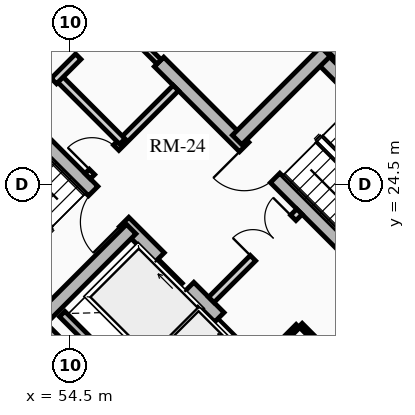
"""IFC4 building model, lengths in metres.
Left out: names, types, materials, properties, quantities, classifications, styles, units other than length and angle.
Written with IfcOpenShell. Run it as: python <this file> out.ifc"""

import sys

from ifc_helpers import new_model, si_unit, direction, frame, frame_2d, origin, place, context, subcontext, project, spatial, rectangle, extrude, source, transform, mapped, element, fill, save


model = new_model("IFC4")
c1 = context("Model", 3, precision=1e-05, world=origin(), true_north=direction((0.0, 1.0)))
c2 = subcontext(c1, "Body", "Model", "MODEL_VIEW")
j1 = project(units=[si_unit("LENGTHUNIT", "METRE"), si_unit("PLANEANGLEUNIT", "RADIAN")], contexts=[c1])
p1 = place(None, origin())
s1 = spatial("IfcSite", under=j1, at=p1, CompositionType="ELEMENT")
p2 = place(p1, origin())
s2 = spatial("IfcBuilding", under=s1, at=p2, CompositionType="ELEMENT")
p3 = place(p2, frame((0.0, 0.0, 177.79)))
s3 = spatial("IfcBuildingStorey", under=s2, at=p3, CompositionType="ELEMENT", Elevation=177.79)
for number, where, z_axis, x_axis in (
    (1, (58.702, 15.732, 0.0), (0.0, 0.0, 1.0), (-0.707, 0.707, 0.0)),
    (2, (66.268, 23.298, 0.0), (0.0, 0.0, 1.0), (-0.707, 0.707, 0.0)),
):
    element("IfcWall", number, at=place(p3, frame(where, z_axis=z_axis, x_axis=x_axis)), inside=s3, PredefinedType="SHEAR", context=c2, shape_type="SweptSolid", body=[
        extrude(rectangle(XDim=14.1, YDim=0.4, at=frame_2d((7.05, 0.0))), origin(), (0.0, 0.0, 1.0), 2.91),
    ])
p4 = place(p3, frame((58.561, 15.873, 0.0), z_axis=(0.0, 0.0, 1.0), x_axis=(0.707106781187, 0.707106781187, 0.0)))
e3 = element("IfcWall", 3, at=p4, inside=s3, PredefinedType="SHEAR", context=c2, shape_type="SweptSolid", body=[
    extrude(rectangle(XDim=10.7, YDim=0.4, at=frame_2d((5.35, 0.0))), origin(), (0.0, 0.0, 1.0), 2.91),
])
m1 = source(origin(), c2, "Body", "SweptSolid", [
    extrude(rectangle(XDim=1.5, YDim=2.02, at=frame_2d((0.75, 1.01))), frame((0.0, 0.21, 0.0), z_axis=(0.0, -1.0, 0.0), x_axis=(1.0, 0.0, 0.0)), (0.0, 0.0, 1.0), 0.42),
])
p5 = place(p4, frame((5.45, 0.0, 0.0)))
e4 = element("IfcOpeningElement", 4, at=p5, cuts=e3, PredefinedType="OPENING", context=c2, shape_type="MappedRepresentation", body=[
    mapped(m1, transform((0.0, 0.0, 0.0), x_axis=(1.0, 0.0, 0.0), y_axis=(0.0, 1.0, 0.0), z_axis=(0.0, 0.0, 1.0), scale=1.0)),
])
p6 = place(p3, frame((48.873, 25.561, 0.0), z_axis=(0.0, 0.0, 1.0), x_axis=(0.707106781187, 0.707106781187, 0.0)))
e5 = element("IfcWall", 5, at=p6, inside=s3, PredefinedType="SHEAR", context=c2, shape_type="SweptSolid", body=[
    extrude(rectangle(XDim=10.7, YDim=0.4, at=frame_2d((5.35, 0.0))), origin(), (0.0, 0.0, 1.0), 2.91),
])
p7 = place(p6, frame((4.6, 0.0, 0.0)))
e6 = element("IfcOpeningElement", 6, at=p7, cuts=e5, PredefinedType="OPENING", context=c2, shape_type="MappedRepresentation", body=[
    mapped(m1, transform((0.0, 0.0, 0.0), x_axis=(1.0, 0.0, 0.0), y_axis=(0.0, 1.0, 0.0), z_axis=(0.0, 0.0, 1.0), scale=1.0)),
])
p8 = place(p3, frame((61.06, 18.373, 0.0), z_axis=(0.0, 0.0, 1.0), x_axis=(-0.707106781187, 0.707106781187, 0.0)))
e7 = element("IfcWall", 7, at=p8, inside=s3, PredefinedType="SHEAR", context=c2, shape_type="SweptSolid", body=[
    extrude(rectangle(XDim=13.7, YDim=0.35, at=frame_2d((6.85, 0.0))), origin(), (0.0, 0.0, 1.0), 2.91),
])
m2 = source(origin(), c2, "Body", "SweptSolid", [
    extrude(rectangle(XDim=1.1, YDim=2.015, at=frame_2d((0.55, 1.007))), frame((0.0, 0.185, 0.0), z_axis=(0.0, -1.0, 0.0), x_axis=(1.0, 0.0, 0.0)), (0.0, 0.0, 1.0), 0.37),
])
p9 = place(p8, frame((4.85, 0.0, 0.0)))
e8 = element("IfcOpeningElement", 8, at=p9, cuts=e7, PredefinedType="OPENING", context=c2, shape_type="MappedRepresentation", body=[
    mapped(m2, transform((0.0, 0.0, 0.0), x_axis=(1.0, 0.0, 0.0), y_axis=(0.0, 1.0, 0.0), z_axis=(0.0, 0.0, 1.0), scale=1.0)),
])
p10 = place(p8, frame((0.625, 0.0, 0.0)))
e9 = element("IfcOpeningElement", 9, at=p10, cuts=e7, PredefinedType="OPENING", context=c2, shape_type="MappedRepresentation", body=[
    mapped(m2, transform((0.0, 0.0, 0.0), x_axis=(1.0, 0.0, 0.0), y_axis=(0.0, 1.0, 0.0), z_axis=(0.0, 0.0, 1.0), scale=1.0)),
])
p11 = place(p8, frame((2.625, 0.0, 0.0)))
e10 = element("IfcOpeningElement", 10, at=p11, cuts=e7, PredefinedType="OPENING", context=c2, shape_type="MappedRepresentation", body=[
    mapped(m2, transform((0.0, 0.0, 0.0), x_axis=(1.0, 0.0, 0.0), y_axis=(0.0, 1.0, 0.0), z_axis=(0.0, 0.0, 1.0), scale=1.0)),
])
m3 = source(origin(), c2, "Body", "SweptSolid", [
    extrude(rectangle(XDim=1.15, YDim=2.02, at=frame_2d((0.575, 1.01))), frame((0.0, 0.185, 0.0), z_axis=(0.0, -1.0, 0.0), x_axis=(1.0, 0.0, 0.0)), (0.0, 0.0, 1.0), 0.37),
])
p12 = place(p8, frame((7.27, 0.0, 0.0)))
e11 = element("IfcOpeningElement", 11, at=p12, cuts=e7, PredefinedType="OPENING", context=c2, shape_type="MappedRepresentation", body=[
    mapped(m3, transform((0.0, 0.0, 0.0), x_axis=(1.0, 0.0, 0.0), y_axis=(0.0, 1.0, 0.0), z_axis=(0.0, 0.0, 1.0), scale=1.0)),
])
p13 = place(p3, frame((63.627, 20.94, 0.0), z_axis=(0.0, 0.0, 1.0), x_axis=(-0.707119496762, 0.707094065383, 0.0)))
e12 = element("IfcWall", 12, at=p13, inside=s3, PredefinedType="SHEAR", context=c2, shape_type="SweptSolid", body=[
    extrude(rectangle(XDim=9.6, YDim=0.35, at=frame_2d((4.8, 0.0))), origin(), (0.0, 0.0, 1.0), 2.91),
])
p14 = place(p13, frame((5.28, 0.0, 0.0)))
e13 = element("IfcOpeningElement", 13, at=p14, cuts=e12, PredefinedType="OPENING", context=c2, shape_type="MappedRepresentation", body=[
    mapped(m3, transform((0.0, 0.0, 0.0), x_axis=(1.0, 0.0, 0.0), y_axis=(0.0, 1.0, 0.0), z_axis=(0.0, 0.0, 1.0), scale=1.0)),
])
p15 = place(p3, frame((53.922, 21.141, 0.0), z_axis=(0.0, 0.0, 1.0), x_axis=(-0.707106781187, 0.707106781187, 0.0)))
e14 = element("IfcWall", 14, at=p15, inside=s3, PredefinedType="SHEAR", context=c2, shape_type="SweptSolid", body=[
    extrude(rectangle(XDim=6.695, YDim=0.35, at=frame_2d((3.348, 0.0))), origin(), (0.0, 0.0, 1.0), 2.91),
])
p16 = place(p3, frame((53.784, 21.003, 0.0), z_axis=(0.0, 0.0, 1.0), x_axis=(0.707106781187, 0.707106781187, 0.0)))
e15 = element("IfcWall", 15, at=p16, inside=s3, PredefinedType="SHEAR", context=c2, shape_type="SweptSolid", body=[
    extrude(rectangle(XDim=3.285, YDim=0.35, at=frame_2d((1.643, 0.0))), origin(), (0.0, 0.0, 1.0), 2.91),
])
p17 = place(p3, frame((65.812, 23.125, 0.0), z_axis=(0.0, 0.0, 1.0), x_axis=(-0.707106781187, 0.707106781187, 0.0)))
e16 = element("IfcWall", 16, at=p17, inside=s3, PredefinedType="SHEAR", context=c2, shape_type="SweptSolid", body=[
    extrude(rectangle(XDim=6.695, YDim=0.35, at=frame_2d((3.348, 0.0))), origin(), (0.0, 0.0, 1.0), 2.91),
])
p18 = place(p3, frame((58.893, 25.674, 0.0), z_axis=(0.0, 0.0, 1.0), x_axis=(0.707106781187, 0.707106781187, 0.0)))
e17 = element("IfcWall", 17, at=p18, inside=s3, PredefinedType="SHEAR", context=c2, shape_type="SweptSolid", body=[
    extrude(rectangle(XDim=3.285, YDim=0.35, at=frame_2d((1.643, 0.0))), origin(), (0.0, 0.0, 1.0), 2.91),
])
p19 = place(p3, frame((55.888, 19.069, 0.0), z_axis=(0.0, 0.0, 1.0), x_axis=(0.707106781187, 0.707106781187, 0.0)))
e18 = element("IfcWall", 18, at=p19, inside=s3, PredefinedType="SHEAR", context=c2, shape_type="SweptSolid", body=[
    extrude(rectangle(XDim=2.97, YDim=0.2, at=frame_2d((1.485, 0.0))), origin(), (0.0, 0.0, 1.0), 2.91),
])
p20 = place(p3, frame((56.015, 19.366, 0.0), z_axis=(0.0, 0.0, 1.0), x_axis=(-0.707106781187, 0.707106781187, 0.0)))
e19 = element("IfcWall", 19, at=p20, inside=s3, PredefinedType="SHEAR", context=c2, shape_type="SweptSolid", body=[
    extrude(rectangle(XDim=2.44, YDim=0.2, at=frame_2d((1.22, 0.0))), origin(), (0.0, 0.0, 1.0), 2.91),
])
p21 = place(p3, frame((58.214, 21.467, 0.0), z_axis=(0.0, 0.0, 1.0), x_axis=(0.707106781187, 0.707106781187, 0.0)))
e20 = element("IfcWall", 20, at=p21, inside=s3, PredefinedType="PARTITIONING", context=c2, shape_type="SweptSolid", body=[
    extrude(rectangle(XDim=3.28, YDim=0.2, at=frame_2d((1.64, 0.0))), origin(), (0.0, 0.0, 1.0), 2.675),
])
m4 = source(origin(), c2, "Body", "SweptSolid", [
    extrude(rectangle(XDim=1.5, YDim=2.02, at=frame_2d((0.75, 1.01))), frame((0.0, 0.11, 0.0), z_axis=(0.0, -1.0, 0.0), x_axis=(1.0, 0.0, 0.0)), (0.0, 0.0, 1.0), 0.22),
])
p22 = place(p21, frame((1.55, 0.0, 0.0)))
e21 = element("IfcOpeningElement", 21, at=p22, cuts=e20, PredefinedType="OPENING", context=c2, shape_type="MappedRepresentation", body=[
    mapped(m4, transform((0.0, 0.0, 0.0), x_axis=(1.0, 0.0, 0.0), y_axis=(0.0, 1.0, 0.0), z_axis=(0.0, 0.0, 1.0), scale=1.0)),
])
p23 = place(p3, frame((54.961, 24.719, 0.0), z_axis=(0.0, 0.0, 1.0), x_axis=(0.707106781187, 0.707106781187, 0.0)))
e22 = element("IfcWall", 22, at=p23, inside=s3, PredefinedType="PARTITIONING", context=c2, shape_type="SweptSolid", body=[
    extrude(rectangle(XDim=3.28, YDim=0.2, at=frame_2d((1.64, 0.0))), origin(), (0.0, 0.0, 1.0), 2.675),
])
m5 = source(origin(), c2, "Body", "SweptSolid", [
    extrude(rectangle(XDim=0.9, YDim=2.005, at=frame_2d((0.45, 1.002))), frame((0.0, 0.11, 0.0), z_axis=(0.0, -1.0, 0.0), x_axis=(1.0, 0.0, 0.0)), (0.0, 0.0, 1.0), 0.22),
])
p24 = place(p23, frame((0.16, 0.0, 0.0)))
e23 = element("IfcOpeningElement", 23, at=p24, cuts=e22, PredefinedType="OPENING", context=c2, shape_type="MappedRepresentation", body=[
    mapped(m5, transform((0.0, 0.0, 0.0), x_axis=(1.0, 0.0, 0.0), y_axis=(0.0, 1.0, 0.0), z_axis=(0.0, 0.0, 1.0), scale=1.0)),
])
p25 = place(p3, frame((55.874, 25.631, 0.0), z_axis=(0.0, 0.0, 1.0), x_axis=(-0.707157639372, 0.707055919343, 0.0)))
e24 = element("IfcWall", 24, at=p25, inside=s3, PredefinedType="PARTITIONING", context=c2, shape_type="SweptSolid", body=[
    extrude(rectangle(XDim=2.4, YDim=0.2, at=frame_2d((1.2, 0.0))), origin(), (0.0, 0.0, 1.0), 2.675),
])
p26 = place(p3, frame((53.264, 26.416, 0.0), z_axis=(0.0, 0.0, 1.0), x_axis=(0.707106781187, 0.707106781187, 0.0)))
e25 = element("IfcWall", 25, at=p26, inside=s3, PredefinedType="PARTITIONING", context=c2, shape_type="SweptSolid", body=[
    extrude(rectangle(XDim=3.28, YDim=0.2, at=frame_2d((1.64, 0.0))), origin(), (0.0, 0.0, 1.0), 2.675),
])
m6 = source(origin(), c2, "Body", "SweptSolid", [
    extrude(rectangle(XDim=1.0, YDim=2.015, at=frame_2d((0.5, 1.007))), frame((0.0, 0.11, 0.0), z_axis=(0.0, -1.0, 0.0), x_axis=(1.0, 0.0, 0.0)), (0.0, 0.0, 1.0), 0.22),
])
p27 = place(p26, frame((0.14, 0.0, 0.0)))
e26 = element("IfcOpeningElement", 26, at=p27, cuts=e25, PredefinedType="OPENING", context=c2, shape_type="MappedRepresentation", body=[
    mapped(m6, transform((0.0, 0.0, 0.0), x_axis=(1.0, 0.0, 0.0), y_axis=(0.0, 1.0, 0.0), z_axis=(0.0, 0.0, 1.0), scale=1.0)),
])
p28 = place(p26, frame((2.05, 0.0, 0.0)))
e27 = element("IfcOpeningElement", 27, at=p28, cuts=e25, PredefinedType="OPENING", context=c2, shape_type="MappedRepresentation", body=[
    mapped(m5, transform((0.0, 0.0, 0.0), x_axis=(1.0, 0.0, 0.0), y_axis=(0.0, 1.0, 0.0), z_axis=(0.0, 0.0, 1.0), scale=1.0)),
])
p29 = place(p3, frame((61.835, 19.529, 0.0), z_axis=(0.0, 0.0, 1.0), x_axis=(-0.707174592913, 0.707038962956, 0.0)))
e28 = element("IfcWall", 28, at=p29, inside=s3, PredefinedType="PARTITIONING", context=c2, shape_type="SweptSolid", body=[
    extrude(rectangle(XDim=1.8, YDim=0.125, at=frame_2d((0.9, 0.0))), origin(), (0.0, 0.0, 1.0), 2.675),
])
m7 = source(origin(), c2, "Body", "SweptSolid", [
    extrude(rectangle(XDim=0.9, YDim=2.005, at=frame_2d((0.45, 1.002))), frame((0.0, 0.073, 0.0), z_axis=(0.0, -1.0, 0.0), x_axis=(1.0, 0.0, 0.0)), (0.0, 0.0, 1.0), 0.145),
])
p30 = place(p29, frame((0.42, 0.0, 0.0)))
e29 = element("IfcOpeningElement", 29, at=p30, cuts=e28, PredefinedType="OPENING", context=c2, shape_type="MappedRepresentation", body=[
    mapped(m7, transform((0.0, 0.0, 0.0), x_axis=(1.0, 0.0, 0.0), y_axis=(0.0, 1.0, 0.0), z_axis=(0.0, 0.0, 1.0), scale=1.0)),
])
p31 = place(p3, frame((59.713, 19.996, 0.0), z_axis=(0.0, 0.0, 1.0), x_axis=(0.707217726, 0.706995818963, 0.0)))
e30 = element("IfcWall", 30, at=p31, inside=s3, PredefinedType="PARTITIONING", context=c2, shape_type="SweptSolid", body=[
    extrude(rectangle(XDim=1.1, YDim=0.125, at=frame_2d((0.55, 0.0))), origin(), (0.0, 0.0, 1.0), 2.675),
])
p32 = place(p3, frame((56.839, 27.728, 0.0), z_axis=(0.0, 0.0, 1.0), x_axis=(-0.707106781187, 0.707106781187, 0.0)))
e31 = element("IfcWall", 31, at=p32, inside=s3, PredefinedType="PARTITIONING", context=c2, shape_type="SweptSolid", body=[
    extrude(rectangle(XDim=3.9, YDim=0.16, at=frame_2d((1.95, 0.0))), origin(), (0.0, 0.0, 1.0), 2.675),
])
m8 = source(origin(), c2, "Body", "SweptSolid", [
    extrude(rectangle(XDim=0.9, YDim=2.005, at=frame_2d((0.45, 1.002))), frame((0.0, 0.09, 0.0), z_axis=(0.0, -1.0, 0.0), x_axis=(1.0, 0.0, 0.0)), (0.0, 0.0, 1.0), 0.18),
])
p33 = place(p32, frame((2.2, 0.0, 0.0)))
e32 = element("IfcOpeningElement", 32, at=p33, cuts=e31, PredefinedType="OPENING", context=c2, shape_type="MappedRepresentation", body=[
    mapped(m8, transform((0.0, 0.0, 0.0), x_axis=(1.0, 0.0, 0.0), y_axis=(0.0, 1.0, 0.0), z_axis=(0.0, 0.0, 1.0), scale=1.0)),
])
m9 = source(origin(), c2, "Body", "SweptSolid", [
    extrude(rectangle(XDim=1.1, YDim=2.015, at=frame_2d((0.55, 1.007))), frame((0.0, 0.025, 0.0), z_axis=(0.0, -1.0, 0.0), x_axis=(1.0, 0.0, 0.0)), (0.0, 0.0, 1.0), 0.05),
])
p34 = place(p9, origin())
e33 = element("IfcDoor", 33, at=p34, inside=s3, OperationType="SLIDING_TO_RIGHT", PredefinedType="DOOR", context=c2, shape_type="MappedRepresentation", body=[
    mapped(m9, transform((0.0, 0.0, 0.0), x_axis=(1.0, 0.0, 0.0), y_axis=(0.0, 1.0, 0.0), z_axis=(0.0, 0.0, 1.0), scale=1.0)),
])
fill(e8, e33)
p35 = place(p11, origin())
e34 = element("IfcDoor", 34, at=p35, inside=s3, OperationType="SLIDING_TO_RIGHT", PredefinedType="DOOR", context=c2, shape_type="MappedRepresentation", body=[
    mapped(m9, transform((0.0, 0.0, 0.0), x_axis=(1.0, 0.0, 0.0), y_axis=(0.0, 1.0, 0.0), z_axis=(0.0, 0.0, 1.0), scale=1.0)),
])
fill(e10, e34)
m10 = source(origin(), c2, "Body", "SweptSolid", [
    extrude(rectangle(XDim=1.15, YDim=2.02, at=frame_2d((0.575, 1.01))), frame((0.0, 0.025, 0.0), z_axis=(0.0, -1.0, 0.0), x_axis=(1.0, 0.0, 0.0)), (0.0, 0.0, 1.0), 0.05),
])
p36 = place(p12, origin())
e35 = element("IfcDoor", 35, at=p36, inside=s3, OperationType="SINGLE_SWING_LEFT", PredefinedType="DOOR", context=c2, shape_type="MappedRepresentation", body=[
    mapped(m10, transform((0.0, 0.0, 0.0), x_axis=(1.0, 0.0, 0.0), y_axis=(0.0, 1.0, 0.0), z_axis=(0.0, 0.0, 1.0), scale=1.0)),
])
fill(e11, e35)
p37 = place(p14, origin())
e36 = element("IfcDoor", 36, at=p37, inside=s3, OperationType="SINGLE_SWING_RIGHT", PredefinedType="DOOR", context=c2, shape_type="MappedRepresentation", body=[
    mapped(m10, transform((0.0, 0.0, 0.0), x_axis=(1.0, 0.0, 0.0), y_axis=(0.0, 1.0, 0.0), z_axis=(0.0, 0.0, 1.0), scale=1.0)),
])
fill(e13, e36)
m11 = source(origin(), c2, "Body", "SweptSolid", [
    extrude(rectangle(XDim=1.5, YDim=2.02, at=frame_2d((0.75, 1.01))), frame((0.0, 0.025, 0.0), z_axis=(0.0, -1.0, 0.0), x_axis=(1.0, 0.0, 0.0)), (0.0, 0.0, 1.0), 0.05),
])
p38 = place(p22, origin())
e37 = element("IfcDoor", 37, at=p38, inside=s3, OperationType="DOUBLE_DOOR_SINGLE_SWING", PredefinedType="DOOR", context=c2, shape_type="MappedRepresentation", body=[
    mapped(m11, transform((0.0, 0.0, 0.0), x_axis=(1.0, 0.0, 0.0), y_axis=(0.0, 1.0, 0.0), z_axis=(0.0, 0.0, 1.0), scale=1.0)),
])
fill(e21, e37)
m12 = source(origin(), c2, "Body", "SweptSolid", [
    extrude(rectangle(XDim=0.9, YDim=2.005, at=frame_2d((0.45, 1.002))), frame((0.0, 0.025, 0.0), z_axis=(0.0, -1.0, 0.0), x_axis=(1.0, 0.0, 0.0)), (0.0, 0.0, 1.0), 0.05),
])
p39 = place(p24, origin())
e38 = element("IfcDoor", 38, at=p39, inside=s3, OperationType="SINGLE_SWING_LEFT", PredefinedType="DOOR", context=c2, shape_type="MappedRepresentation", body=[
    mapped(m12, transform((0.0, 0.0, 0.0), x_axis=(1.0, 0.0, 0.0), y_axis=(0.0, 1.0, 0.0), z_axis=(0.0, 0.0, 1.0), scale=1.0)),
])
fill(e23, e38)
m13 = source(origin(), c2, "Body", "SweptSolid", [
    extrude(rectangle(XDim=1.0, YDim=2.015, at=frame_2d((0.5, 1.007))), frame((0.0, 0.025, 0.0), z_axis=(0.0, -1.0, 0.0), x_axis=(1.0, 0.0, 0.0)), (0.0, 0.0, 1.0), 0.05),
])
p40 = place(p27, origin())
e39 = element("IfcDoor", 39, at=p40, inside=s3, OperationType="SINGLE_SWING_RIGHT", PredefinedType="DOOR", context=c2, shape_type="MappedRepresentation", body=[
    mapped(m13, transform((0.0, 0.0, 0.0), x_axis=(1.0, 0.0, 0.0), y_axis=(0.0, 1.0, 0.0), z_axis=(0.0, 0.0, 1.0), scale=1.0)),
])
fill(e26, e39)
p41 = place(p28, origin())
e40 = element("IfcDoor", 40, at=p41, inside=s3, OperationType="SINGLE_SWING_RIGHT", PredefinedType="DOOR", context=c2, shape_type="MappedRepresentation", body=[
    mapped(m12, transform((0.0, 0.0, 0.0), x_axis=(1.0, 0.0, 0.0), y_axis=(0.0, 1.0, 0.0), z_axis=(0.0, 0.0, 1.0), scale=1.0)),
])
fill(e27, e40)
save(model, sys.argv[1])
